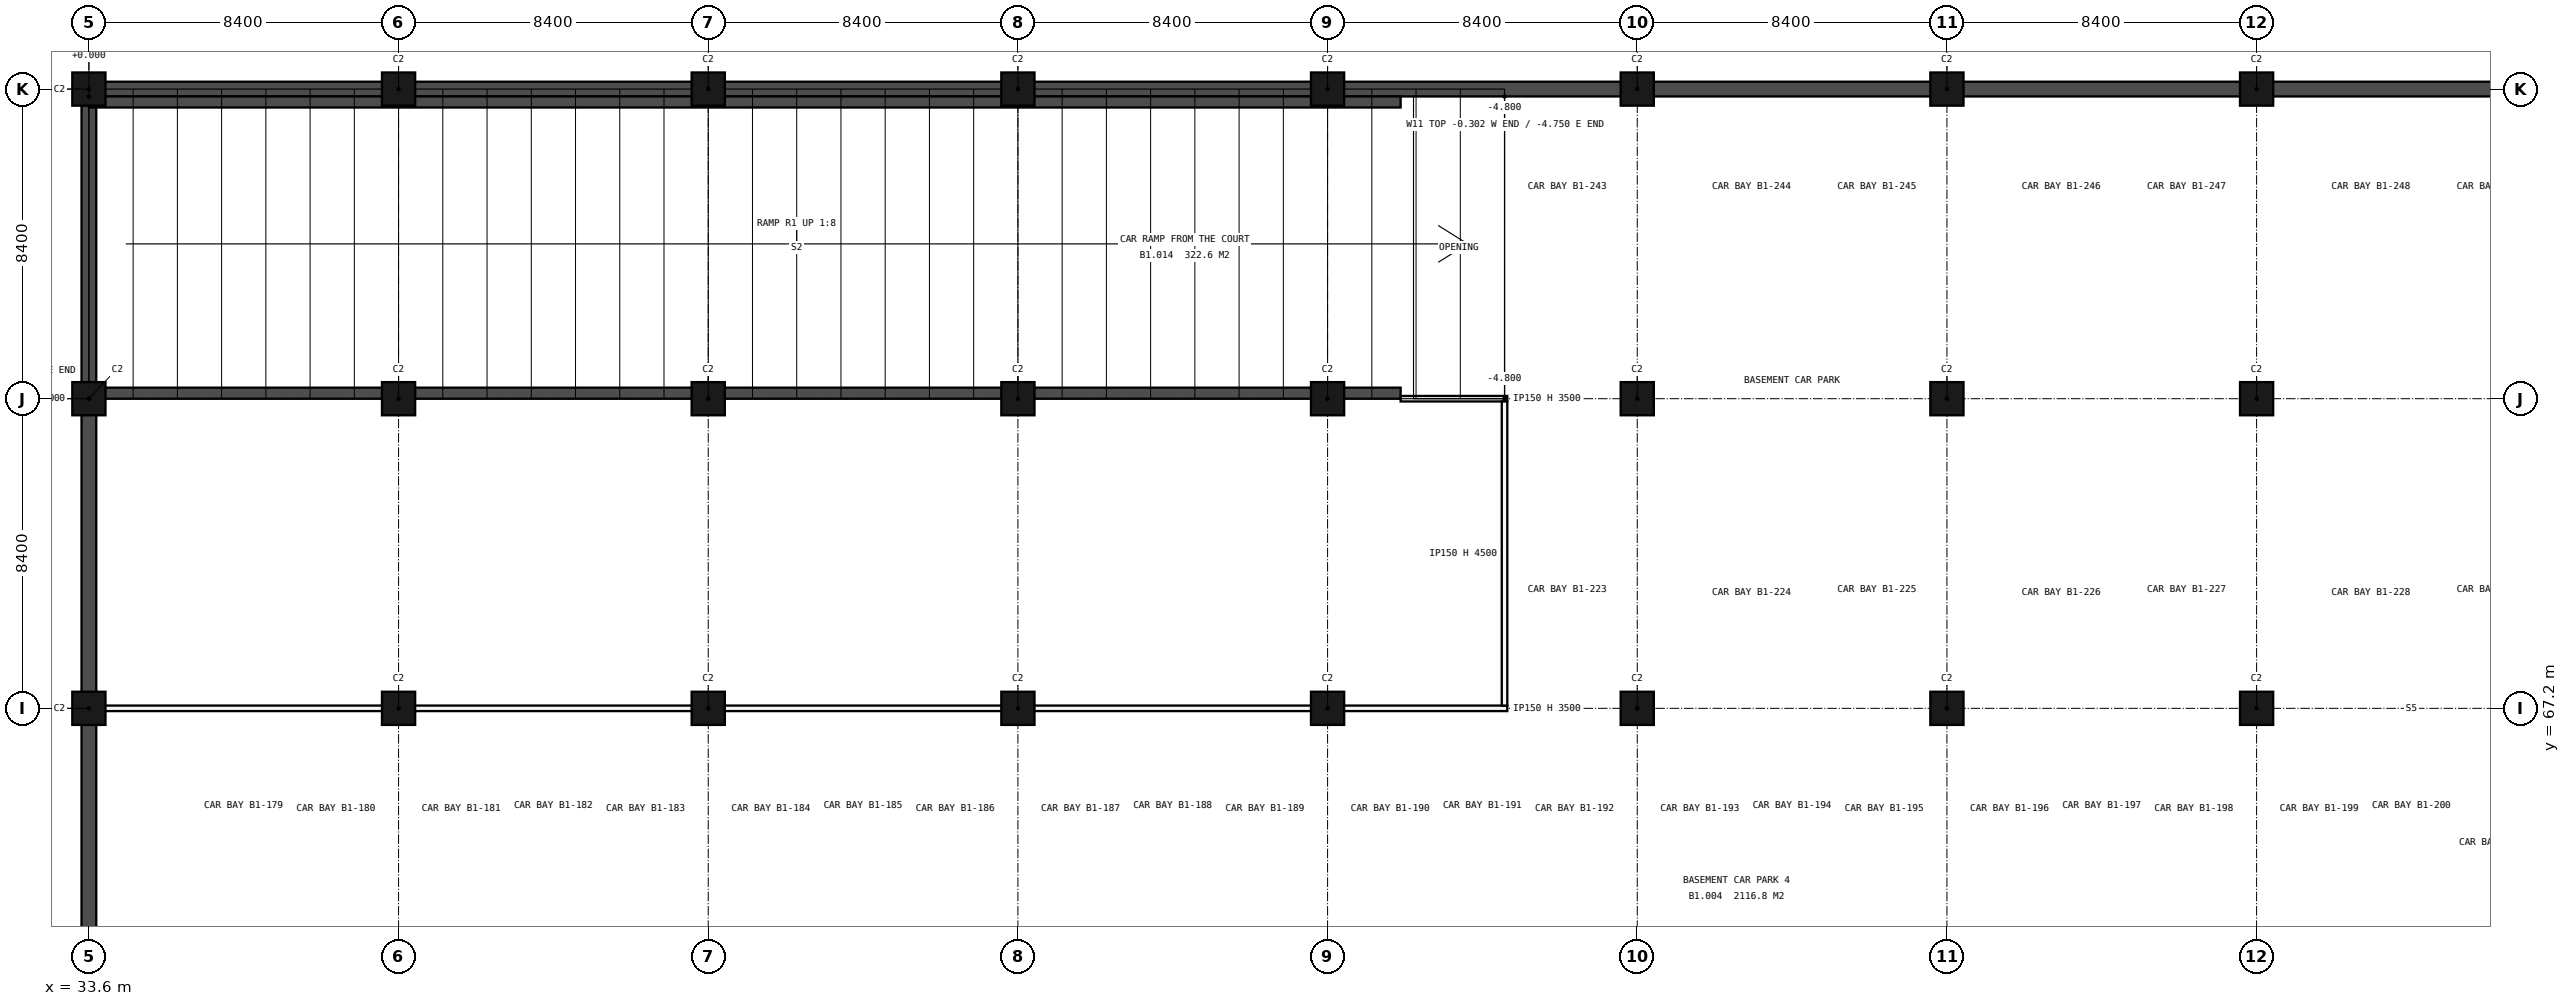
"""IFC4 building model, lengths in metres.
Left out: names, types, materials, properties, quantities, classifications, styles, units other than length and angle.
Written with IfcOpenShell. Run it as: python <this file> out.ifc"""

import sys

from ifc_helpers import new_model, si_unit, direction, frame, frame_2d, origin, origin_2d, place, context, subcontext, project, spatial, polyline, rectangle, outline, extrude, element, save


model = new_model("IFC4")
c1 = context("Model", 3, precision=1e-05, world=origin(), true_north=direction((0.0, 1.0)))
c2 = subcontext(c1, "Body", "Model", "MODEL_VIEW")
j1 = project(units=[si_unit("LENGTHUNIT", "METRE"), si_unit("PLANEANGLEUNIT", "RADIAN")], contexts=[c1])
p1 = place(None, origin())
s1 = spatial("IfcSite", under=j1, at=p1, CompositionType="ELEMENT")
p2 = place(p1, origin())
s2 = spatial("IfcBuilding", under=s1, at=p2, CompositionType="ELEMENT")
p3 = place(p2, frame((0.0, 0.0, -4.8)))
s3 = spatial("IfcBuildingStorey", under=s2, at=p3, CompositionType="ELEMENT", Elevation=-4.8)
for number, where, z_axis, x_axis in (
    (1, (33.6, 67.2, -0.3), (0.0, 0.0, 1.0), (1.0, 0.0, 0.0)),
    (2, (33.6, 75.6, -0.3), (0.0, 0.0, 1.0), (1.0, 0.0, 0.0)),
    (3, (33.6, 84.0, -0.3), (0.0, 0.0, 1.0), (1.0, 0.0, 0.0)),
    (4, (42.0, 67.2, -0.3), (0.0, 0.0, 1.0), (1.0, 0.0, 0.0)),
    (5, (42.0, 75.6, -0.3), (0.0, 0.0, 1.0), (1.0, 0.0, 0.0)),
    (6, (42.0, 84.0, -0.3), (0.0, 0.0, 1.0), (1.0, 0.0, 0.0)),
    (7, (50.4, 67.2, -0.3), (0.0, 0.0, 1.0), (1.0, 0.0, 0.0)),
    (8, (50.4, 75.6, -0.3), (0.0, 0.0, 1.0), (1.0, 0.0, 0.0)),
    (9, (50.4, 84.0, -0.3), (0.0, 0.0, 1.0), (1.0, 0.0, 0.0)),
    (10, (58.8, 67.2, -0.3), (0.0, 0.0, 1.0), (1.0, 0.0, 0.0)),
    (11, (58.8, 75.6, -0.3), (0.0, 0.0, 1.0), (1.0, 0.0, 0.0)),
    (12, (58.8, 84.0, -0.3), (0.0, 0.0, 1.0), (1.0, 0.0, 0.0)),
    (13, (67.2, 67.2, -0.3), (0.0, 0.0, 1.0), (1.0, 0.0, 0.0)),
    (14, (67.2, 75.6, -0.3), (0.0, 0.0, 1.0), (1.0, 0.0, 0.0)),
    (15, (67.2, 84.0, -0.3), (0.0, 0.0, 1.0), (1.0, 0.0, 0.0)),
    (16, (75.6, 67.2, -0.3), (0.0, 0.0, 1.0), (1.0, 0.0, 0.0)),
    (17, (75.6, 75.6, -0.3), (0.0, 0.0, 1.0), (1.0, 0.0, 0.0)),
    (18, (75.6, 84.0, -0.3), (0.0, 0.0, 1.0), (1.0, 0.0, 0.0)),
    (19, (84.0, 67.2, -0.3), (0.0, 0.0, 1.0), (1.0, 0.0, 0.0)),
    (20, (84.0, 75.6, -0.3), (0.0, 0.0, 1.0), (1.0, 0.0, 0.0)),
    (21, (84.0, 84.0, -0.3), (0.0, 0.0, 1.0), (1.0, 0.0, 0.0)),
    (22, (92.4, 67.2, -0.3), (0.0, 0.0, 1.0), (1.0, 0.0, 0.0)),
    (23, (92.4, 75.6, -0.3), (0.0, 0.0, 1.0), (1.0, 0.0, 0.0)),
    (24, (92.4, 84.0, -0.3), (0.0, 0.0, 1.0), (1.0, 0.0, 0.0)),
):
    element("IfcColumn", number, at=place(p3, frame(where, z_axis=z_axis, x_axis=x_axis)), inside=s3, PredefinedType="COLUMN", context=c2, shape_type="SweptSolid", body=[
        extrude(rectangle(XDim=0.9, YDim=0.9, at=origin_2d()), origin(), (0.0, 0.0, 1.0), 4.8),
    ])
p4 = place(p3, frame((143.0, 84.0, -0.3), z_axis=(0.0, 0.0, 1.0), x_axis=(-1.0, 0.0, 0.0)))
e25 = element("IfcWall", 25, at=p4, inside=s3, PredefinedType="SOLIDWALL", context=c2, shape_type="SweptSolid", body=[
    extrude(rectangle(XDim=109.6, YDim=0.4, at=frame_2d((54.8, 0.0))), origin(), (0.0, 0.0, 1.0), 4.8),
])
p5 = place(p3, frame((33.6, 84.2, -0.3), z_axis=(0.0, 0.0, 1.0), x_axis=(0.0, -1.0, 0.0)))
e26 = element("IfcWall", 26, at=p5, inside=s3, PredefinedType="SOLIDWALL", context=c2, shape_type="SweptSolid", body=[
    extrude(rectangle(XDim=34.0, YDim=0.4, at=frame_2d((17.0, 0.0))), origin(), (0.0, 0.0, 1.0), 4.8),
])
for number, where, z_axis, x_axis in (
    (27, (33.6, 75.75, 0.0), (0.0, 0.0, 1.0), (1.0, 0.0, 0.0)),
    (28, (33.6, 83.65, 0.0), (0.0, 0.0, 1.0), (1.0, 0.0, 0.0)),
):
    element("IfcWall", number, at=place(p3, frame(where, z_axis=z_axis, x_axis=x_axis)), inside=s3, PredefinedType="SOLIDWALL", context=c2, shape_type="SweptSolid", body=[
        extrude(outline(polyline([(0.0, 0.0), (35.581, 0.0), (35.581, 0.05), (0.0, 4.498), (0.0, 0.0)])), frame((0.0, 0.15, 0.0), z_axis=(0.0, -1.0, 0.0), x_axis=(1.0, 0.0, 0.0)), (0.0, 0.0, 1.0), 0.3),
    ])
p6 = place(p3, frame((33.8, 67.2, 0.0), z_axis=(0.0, 0.0, 1.0), x_axis=(1.0, 0.0, 0.0)))
e29 = element("IfcWall", 29, at=p6, inside=s3, PredefinedType="PARTITIONING", context=c2, shape_type="SweptSolid", body=[
    extrude(rectangle(XDim=38.275, YDim=0.15, at=frame_2d((19.137, 0.0))), origin(), (0.0, 0.0, 1.0), 3.5),
])
p7 = place(p3, frame((69.181, 75.6, 0.0), z_axis=(0.0, 0.0, 1.0), x_axis=(1.0, 0.0, 0.0)))
e30 = element("IfcWall", 30, at=p7, inside=s3, PredefinedType="PARTITIONING", context=c2, shape_type="SweptSolid", body=[
    extrude(rectangle(XDim=2.894, YDim=0.15, at=frame_2d((1.447, 0.0))), origin(), (0.0, 0.0, 1.0), 3.5),
])
p8 = place(p3, frame((72.0, 67.275, 0.0), z_axis=(0.0, 0.0, 1.0), x_axis=(0.0, 1.0, 0.0)))
e31 = element("IfcWall", 31, at=p8, inside=s3, PredefinedType="PARTITIONING", context=c2, shape_type="SweptSolid", body=[
    extrude(rectangle(XDim=8.25, YDim=0.15, at=frame_2d((4.125, 0.0))), origin(), (0.0, 0.0, 1.0), 4.5),
])
save(model, sys.argv[1])
